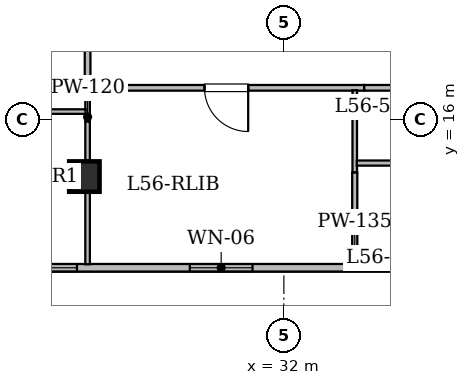
"""IFC4 building model, lengths in metres.
Left out: names, types, materials, properties, quantities, classifications, styles, units other than length and angle.
Written with IfcOpenShell. Run it as: python <this file> out.ifc"""

import sys

from ifc_helpers import new_model, si_unit, direction, frame, frame_2d, origin, origin_2d, place, context, subcontext, project, spatial, rectangle, hollow_rectangle, extrude, element, fill, save


model = new_model("IFC4")
c1 = context("Model", 3, precision=1e-05, world=origin(), true_north=direction((0.0, 1.0)))
c2 = subcontext(c1, "Body", "Model", "MODEL_VIEW")
j1 = project(units=[si_unit("LENGTHUNIT", "METRE"), si_unit("PLANEANGLEUNIT", "RADIAN")], contexts=[c1])
p1 = place(None, origin())
s1 = spatial("IfcSite", under=j1, at=p1, CompositionType="ELEMENT")
p2 = place(p1, origin())
s2 = spatial("IfcBuilding", under=s1, at=p2, CompositionType="ELEMENT")
p3 = place(p2, frame((0.0, 0.0, 220.85)))
s3 = spatial("IfcBuildingStorey", under=s2, at=p3, CompositionType="ELEMENT", Elevation=220.85)
p4 = place(p3, frame((26.75, 14.5, 0.0), z_axis=(0.0, 0.0, 1.0), x_axis=(1.0, 0.0, 0.0)))
e1 = element("IfcColumn", 1, at=p4, inside=s3, PredefinedType="COLUMN", context=c2, shape_type="SweptSolid", body=[
    extrude(hollow_rectangle(XDim=0.8, YDim=0.8, WallThickness=0.04, at=origin_2d()), origin(), (0.0, 0.0, 1.0), 3.65),
])
p5 = place(p3, frame((65.696, 12.1, 0.0), z_axis=(0.0, 0.0, 1.0), x_axis=(-1.0, 0.0, 0.0)))
e2 = element("IfcWall", 2, at=p5, inside=s3, PredefinedType="STANDARD", context=c2, shape_type="SweptSolid", body=[
    extrude(rectangle(XDim=41.393, YDim=0.2, at=frame_2d((20.697, 0.0))), origin(), (0.0, 0.0, 1.0), 3.43),
])
p6 = place(p5, frame((34.521, 0.0, 0.85)))
e3 = element("IfcOpeningElement", 3, at=p6, cuts=e2, PredefinedType="OPENING", context=c2, shape_type="SweptSolid", body=[
    extrude(rectangle(XDim=1.65, YDim=1.55, at=frame_2d((0.825, 0.775))), frame((0.0, 0.11, 0.0), z_axis=(0.0, -1.0, 0.0), x_axis=(1.0, 0.0, 0.0)), (0.0, 0.0, 1.0), 0.22),
])
p7 = place(p5, frame((39.14, 0.0, 0.85)))
e4 = element("IfcOpeningElement", 4, at=p7, cuts=e2, PredefinedType="OPENING", context=c2, shape_type="SweptSolid", body=[
    extrude(rectangle(XDim=1.65, YDim=1.55, at=frame_2d((0.825, 0.775))), frame((0.0, 0.11, 0.0), z_axis=(0.0, -1.0, 0.0), x_axis=(1.0, 0.0, 0.0)), (0.0, 0.0, 1.0), 0.22),
])
p8 = place(p5, frame((15.596, 0.0, 0.8)))
e5 = element("IfcOpeningElement", 5, at=p8, cuts=e2, PredefinedType="OPENING", context=c2, shape_type="SweptSolid", body=[
    extrude(rectangle(XDim=1.2, YDim=1.5, at=frame_2d((0.6, 0.75))), frame((0.0, 0.11, 0.0), z_axis=(0.0, -1.0, 0.0), x_axis=(1.0, 0.0, 0.0)), (0.0, 0.0, 1.0), 0.22),
])
p9 = place(p5, frame((19.706, 0.0, 0.85)))
e6 = element("IfcOpeningElement", 6, at=p9, cuts=e2, PredefinedType="OPENING", context=c2, shape_type="SweptSolid", body=[
    extrude(rectangle(XDim=1.65, YDim=1.55, at=frame_2d((0.825, 0.775))), frame((0.0, 0.11, 0.0), z_axis=(0.0, -1.0, 0.0), x_axis=(1.0, 0.0, 0.0)), (0.0, 0.0, 1.0), 0.22),
])
p10 = place(p5, frame((11.036, 0.0, 0.85)))
e7 = element("IfcOpeningElement", 7, at=p10, cuts=e2, PredefinedType="OPENING", context=c2, shape_type="SweptSolid", body=[
    extrude(rectangle(XDim=1.65, YDim=1.55, at=frame_2d((0.825, 0.775))), frame((0.0, 0.11, 0.0), z_axis=(0.0, -1.0, 0.0), x_axis=(1.0, 0.0, 0.0)), (0.0, 0.0, 1.0), 0.22),
])
p11 = place(p5, frame((4.786, 0.0, 0.85)))
e8 = element("IfcOpeningElement", 8, at=p11, cuts=e2, PredefinedType="OPENING", context=c2, shape_type="SweptSolid", body=[
    extrude(rectangle(XDim=1.65, YDim=1.55, at=frame_2d((0.825, 0.775))), frame((0.0, 0.11, 0.0), z_axis=(0.0, -1.0, 0.0), x_axis=(1.0, 0.0, 0.0)), (0.0, 0.0, 1.0), 0.22),
])
p12 = place(p3, frame((34.114, 16.835, 0.0), z_axis=(0.0, 0.0, 1.0), x_axis=(-1.0, 0.0, 0.0)))
e9 = element("IfcWall", 9, at=p12, inside=s3, PredefinedType="STANDARD", context=c2, shape_type="SweptSolid", body=[
    extrude(rectangle(XDim=7.214, YDim=0.15, at=frame_2d((3.607, 0.0))), origin(), (0.0, 0.0, 1.0), 2.725),
])
p13 = place(p12, frame((3.053, 0.0, 0.0)))
e10 = element("IfcOpeningElement", 10, at=p13, cuts=e9, PredefinedType="OPENING", context=c2, shape_type="SweptSolid", body=[
    extrude(rectangle(XDim=1.15, YDim=2.2, at=frame_2d((0.575, 1.1))), frame((0.0, 0.085, 0.0), z_axis=(0.0, -1.0, 0.0), x_axis=(1.0, 0.0, 0.0)), (0.0, 0.0, 1.0), 0.17),
])
p14 = place(p3, frame((26.835, 16.9, 0.0), z_axis=(0.0, 0.0, 1.0), x_axis=(0.0, 1.0, 0.0)))
e11 = element("IfcWall", 11, at=p14, inside=s3, PredefinedType="STANDARD", context=c2, shape_type="SweptSolid", body=[
    extrude(rectangle(XDim=3.869, YDim=0.15, at=frame_2d((1.935, 0.0))), origin(), (0.0, 0.0, 1.0), 2.725),
])
p15 = place(p14, frame((1.413, 0.0, 0.0)))
e12 = element("IfcOpeningElement", 12, at=p15, cuts=e11, PredefinedType="OPENING", context=c2, shape_type="SweptSolid", body=[
    extrude(rectangle(XDim=1.0, YDim=2.15, at=frame_2d((0.5, 1.075))), frame((0.0, 0.085, 0.0), z_axis=(0.0, -1.0, 0.0), x_axis=(1.0, 0.0, 0.0)), (0.0, 0.0, 1.0), 0.17),
])
p16 = place(p3, frame((41.55, 16.835, 0.0), z_axis=(0.0, 0.0, 1.0), x_axis=(-1.0, 0.0, 0.0)))
e13 = element("IfcWall", 13, at=p16, inside=s3, PredefinedType="STANDARD", context=c2, shape_type="SweptSolid", body=[
    extrude(rectangle(XDim=7.436, YDim=0.15, at=frame_2d((3.718, 0.0))), origin(), (0.0, 0.0, 1.0), 2.725),
])
p17 = place(p16, frame((3.218, 0.0, 0.0)))
e14 = element("IfcOpeningElement", 14, at=p17, cuts=e13, PredefinedType="OPENING", context=c2, shape_type="SweptSolid", body=[
    extrude(rectangle(XDim=1.0, YDim=2.15, at=frame_2d((0.5, 1.075))), frame((0.0, 0.085, 0.0), z_axis=(0.0, -1.0, 0.0), x_axis=(1.0, 0.0, 0.0)), (0.0, 0.0, 1.0), 0.17),
])
p18 = place(p3, frame((26.835, 15.947, 0.0), z_axis=(0.0, 0.0, 1.0), x_axis=(0.0, 1.0, 0.0)))
e15 = element("IfcWall", 15, at=p18, inside=s3, PredefinedType="PARTITIONING", context=c2, shape_type="SweptSolid", body=[
    extrude(rectangle(XDim=0.823, YDim=0.12, at=frame_2d((0.412, 0.0))), origin(), (0.0, 0.0, 1.0), 3.43),
])
p19 = place(p3, frame((26.835, 12.192, 0.0), z_axis=(0.0, 0.0, 1.0), x_axis=(0.0, 1.0, 0.0)))
e16 = element("IfcWall", 16, at=p19, inside=s3, PredefinedType="PARTITIONING", context=c2, shape_type="SweptSolid", body=[
    extrude(rectangle(XDim=3.755, YDim=0.12, at=frame_2d((1.877, 0.0))), origin(), (0.0, 0.0, 1.0), 2.725),
])
p20 = place(p3, frame((33.865, 16.77, 0.0), z_axis=(0.0, 0.0, 1.0), x_axis=(0.0, -1.0, 0.0)))
e17 = element("IfcWall", 17, at=p20, inside=s3, PredefinedType="PARTITIONING", context=c2, shape_type="SweptSolid", body=[
    extrude(rectangle(XDim=2.164, YDim=0.12, at=frame_2d((1.082, 0.0))), origin(), (0.0, 0.0, 1.0), 3.065),
])
p21 = place(p3, frame((33.865, 14.606, 0.0), z_axis=(0.0, 0.0, 1.0), x_axis=(0.0, -1.0, 0.0)))
e18 = element("IfcWall", 18, at=p21, inside=s3, PredefinedType="PARTITIONING", context=c2, shape_type="SweptSolid", body=[
    extrude(rectangle(XDim=2.414, YDim=0.135, at=frame_2d((1.207, 0.0))), origin(), (0.0, 0.0, 1.0), 2.887),
])
p22 = place(p3, frame((26.783, 16.21, 0.0), z_axis=(0.0, 0.0, 1.0), x_axis=(-1.0, 0.0, 0.0)))
e19 = element("IfcWall", 19, at=p22, inside=s3, PredefinedType="PARTITIONING", context=c2, shape_type="SweptSolid", body=[
    extrude(rectangle(XDim=6.473, YDim=0.12, at=frame_2d((3.236, 0.0))), origin(), (0.0, 0.0, 1.0), 2.887),
])
p23 = place(p22, frame((2.786, 0.0, 0.0)))
e20 = element("IfcOpeningElement", 20, at=p23, cuts=e19, PredefinedType="OPENING", context=c2, shape_type="SweptSolid", body=[
    extrude(rectangle(XDim=0.9, YDim=2.1, at=frame_2d((0.45, 1.05))), frame((0.0, 0.07, 0.0), z_axis=(0.0, -1.0, 0.0), x_axis=(1.0, 0.0, 0.0)), (0.0, 0.0, 1.0), 0.14),
])
p24 = place(p3, frame((37.837, 14.855, 0.0), z_axis=(0.0, 0.0, 1.0), x_axis=(-1.0, 0.0, 0.0)))
e21 = element("IfcWall", 21, at=p24, inside=s3, PredefinedType="PARTITIONING", context=c2, shape_type="SweptSolid", body=[
    extrude(rectangle(XDim=3.918, YDim=0.135, at=frame_2d((1.959, 0.0))), origin(), (0.0, 0.0, 1.0), 3.43),
])
p25 = place(p24, frame((1.555, 0.0, 0.0)))
e22 = element("IfcOpeningElement", 22, at=p25, cuts=e21, PredefinedType="OPENING", context=c2, shape_type="SweptSolid", body=[
    extrude(rectangle(XDim=0.85, YDim=2.1, at=frame_2d((0.425, 1.05))), frame((0.0, 0.077, 0.0), z_axis=(0.0, -1.0, 0.0), x_axis=(1.0, 0.0, 0.0)), (0.0, 0.0, 1.0), 0.155),
])
p26 = place(p6, origin())
e23 = element("IfcWindow", 23, at=p26, inside=s3, PartitioningType="SINGLE_PANEL", PredefinedType="WINDOW", context=c2, shape_type="SweptSolid", body=[
    extrude(rectangle(XDim=1.65, YDim=1.55, at=frame_2d((0.825, 0.775))), frame((0.0, 0.03, 0.0), z_axis=(0.0, -1.0, 0.0), x_axis=(1.0, 0.0, 0.0)), (0.0, 0.0, 1.0), 0.06),
])
fill(e3, e23)
p27 = place(p7, origin())
e24 = element("IfcWindow", 24, at=p27, inside=s3, PartitioningType="SINGLE_PANEL", PredefinedType="WINDOW", context=c2, shape_type="SweptSolid", body=[
    extrude(rectangle(XDim=1.65, YDim=1.55, at=frame_2d((0.825, 0.775))), frame((0.0, 0.03, 0.0), z_axis=(0.0, -1.0, 0.0), x_axis=(1.0, 0.0, 0.0)), (0.0, 0.0, 1.0), 0.06),
])
fill(e4, e24)
p28 = place(p13, origin())
e25 = element("IfcDoor", 25, at=p28, inside=s3, OperationType="SINGLE_SWING_LEFT", PredefinedType="DOOR", context=c2, shape_type="SweptSolid", body=[
    extrude(rectangle(XDim=1.15, YDim=2.2, at=frame_2d((0.575, 1.1))), frame((0.0, 0.025, 0.0), z_axis=(0.0, -1.0, 0.0), x_axis=(1.0, 0.0, 0.0)), (0.0, 0.0, 1.0), 0.05),
])
fill(e10, e25)
save(model, sys.argv[1])
